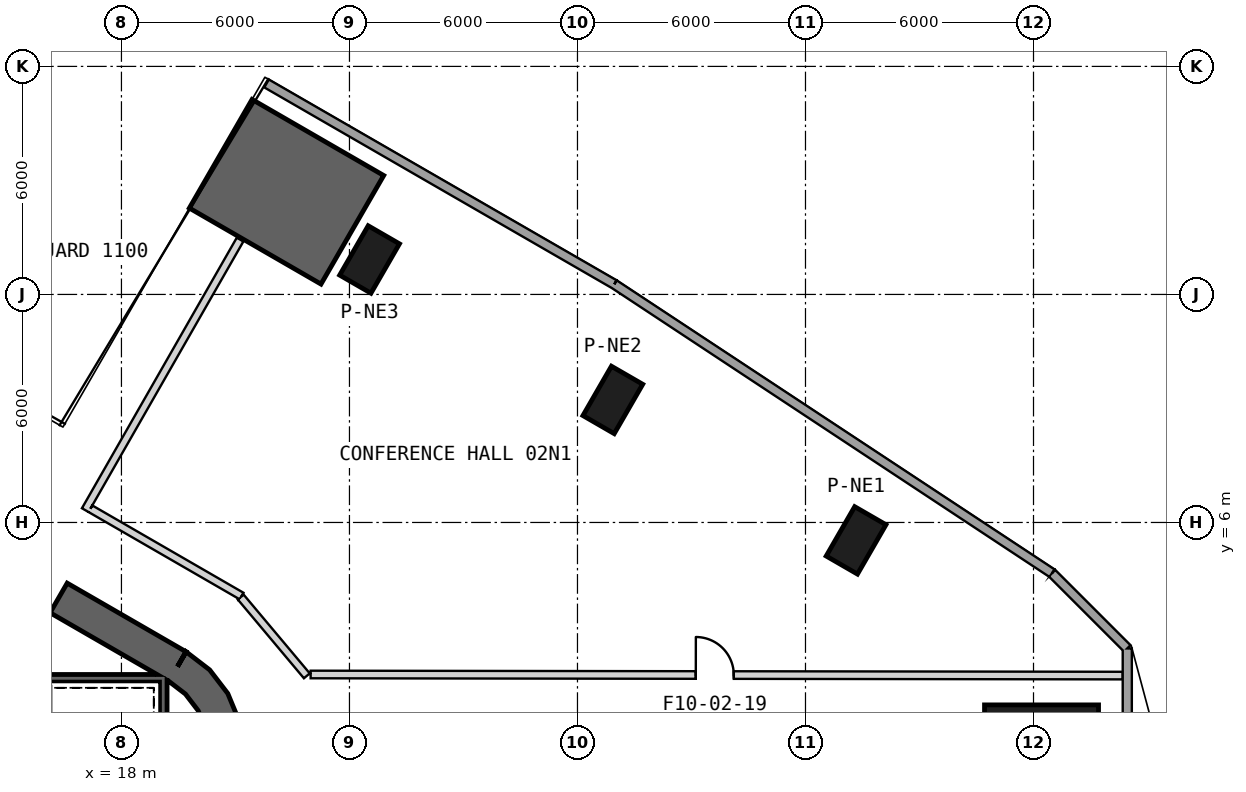
"""IFC4 building model, lengths in metres.
Left out: names, types, materials, properties, quantities, classifications, styles, units other than length and angle.
Written with IfcOpenShell. Run it as: python <this file> out.ifc"""

import sys

from ifc_helpers import new_model, si_unit, direction, frame, frame_2d, origin, origin_2d, place, context, subcontext, project, spatial, polyline, rectangle, outline, extrude, element, fill, save


model = new_model("IFC4")
c1 = context("Model", 3, precision=1e-05, world=origin(), true_north=direction((0.0, 1.0)))
c2 = subcontext(c1, "Body", "Model", "MODEL_VIEW")
j1 = project(units=[si_unit("LENGTHUNIT", "METRE"), si_unit("PLANEANGLEUNIT", "RADIAN")], contexts=[c1])
p1 = place(None, origin())
s1 = spatial("IfcSite", under=j1, at=p1, CompositionType="ELEMENT")
p2 = place(p1, origin())
s2 = spatial("IfcBuilding", under=s1, at=p2, CompositionType="ELEMENT")
p3 = place(p2, frame((0.0, 0.0, 15.5)))
s3 = spatial("IfcBuildingStorey", under=s2, at=p3, CompositionType="ELEMENT", Elevation=15.5)
p4 = place(p3, frame((42.211, 0.0, 0.0), z_axis=(0.0, 0.0, 1.0), x_axis=(1.0, 0.0, 0.0)))
e1 = element("IfcColumn", 1, at=p4, inside=s3, PredefinedType="COLUMN", context=c2, shape_type="SweptSolid", body=[
    extrude(rectangle(XDim=3.0, YDim=2.4, at=origin_2d()), origin(), (0.0, 0.0, 1.0), 6.0),
])
for number, where, z_axis, x_axis in (
    (2, (37.331, 5.528, 0.0), (0.0, 0.0, 1.0), (0.5, 0.866, 0.0)),
    (3, (30.93, 9.224, 0.0), (0.0, 0.0, 1.0), (0.5, 0.866, 0.0)),
    (4, (24.529, 12.92, 0.0), (0.0, 0.0, 1.0), (0.5, 0.866, 0.0)),
):
    element("IfcColumn", number, at=place(p3, frame(where, z_axis=z_axis, x_axis=x_axis)), inside=s3, PredefinedType="COLUMN", context=c2, shape_type="SweptSolid", body=[
        extrude(rectangle(XDim=1.5, YDim=0.95, at=origin_2d()), origin(), (0.0, 0.0, 1.0), 6.0),
    ])
p5 = place(p3, frame((19.475, 2.208, 0.0), z_axis=(0.0, 0.0, 1.0), x_axis=(-0.866028369851, 0.499994862586, 0.0)))
e5 = element("IfcWall", 5, at=p5, inside=s3, PredefinedType="SHEAR", context=c2, shape_type="SweptSolid", body=[
    extrude(rectangle(XDim=31.523, YDim=0.9, at=frame_2d((15.762, 0.0))), origin(), (0.0, 0.0, 1.0), 6.0),
])
p6 = place(p5, frame((7.062, 0.0, 0.0)))
e6 = element("IfcOpeningElement", 6, at=p6, cuts=e5, PredefinedType="OPENING", context=c2, shape_type="SweptSolid", body=[
    extrude(rectangle(XDim=1.2, YDim=2.4, at=frame_2d((0.6, 1.2))), frame((0.0, 0.46, 0.0), z_axis=(0.0, -1.0, 0.0), x_axis=(1.0, 0.0, 0.0)), (0.0, 0.0, 1.0), 0.92),
])
p7 = place(p5, frame((9.762, 0.0, 0.0)))
e7 = element("IfcOpeningElement", 7, at=p7, cuts=e5, PredefinedType="OPENING", context=c2, shape_type="SweptSolid", body=[
    extrude(rectangle(XDim=1.2, YDim=2.4, at=frame_2d((0.6, 1.2))), frame((0.0, 0.46, 0.0), z_axis=(0.0, -1.0, 0.0), x_axis=(1.0, 0.0, 0.0)), (0.0, 0.0, 1.0), 0.92),
])
p8 = place(p5, frame((12.462, 0.0, 0.0)))
e8 = element("IfcOpeningElement", 8, at=p8, cuts=e5, PredefinedType="OPENING", context=c2, shape_type="SweptSolid", body=[
    extrude(rectangle(XDim=1.2, YDim=2.4, at=frame_2d((0.6, 1.2))), frame((0.0, 0.46, 0.0), z_axis=(0.0, -1.0, 0.0), x_axis=(1.0, 0.0, 0.0)), (0.0, 0.0, 1.0), 0.92),
])
p9 = place(p5, frame((15.162, 0.0, 0.0)))
e9 = element("IfcOpeningElement", 9, at=p9, cuts=e5, PredefinedType="OPENING", context=c2, shape_type="SweptSolid", body=[
    extrude(rectangle(XDim=1.2, YDim=2.4, at=frame_2d((0.6, 1.2))), frame((0.0, 0.46, 0.0), z_axis=(0.0, -1.0, 0.0), x_axis=(1.0, 0.0, 0.0)), (0.0, 0.0, 1.0), 0.92),
])
p10 = place(p5, frame((17.862, 0.0, 0.0)))
e10 = element("IfcOpeningElement", 10, at=p10, cuts=e5, PredefinedType="OPENING", context=c2, shape_type="SweptSolid", body=[
    extrude(rectangle(XDim=1.2, YDim=2.4, at=frame_2d((0.6, 1.2))), frame((0.0, 0.46, 0.0), z_axis=(0.0, -1.0, 0.0), x_axis=(1.0, 0.0, 0.0)), (0.0, 0.0, 1.0), 0.92),
])
p11 = place(p5, frame((20.562, 0.0, 0.0)))
e11 = element("IfcOpeningElement", 11, at=p11, cuts=e5, PredefinedType="OPENING", context=c2, shape_type="SweptSolid", body=[
    extrude(rectangle(XDim=1.2, YDim=2.4, at=frame_2d((0.6, 1.2))), frame((0.0, 0.46, 0.0), z_axis=(0.0, -1.0, 0.0), x_axis=(1.0, 0.0, 0.0)), (0.0, 0.0, 1.0), 0.92),
])
p12 = place(p5, frame((23.262, 0.0, 0.0)))
e12 = element("IfcOpeningElement", 12, at=p12, cuts=e5, PredefinedType="OPENING", context=c2, shape_type="SweptSolid", body=[
    extrude(rectangle(XDim=1.2, YDim=2.4, at=frame_2d((0.6, 1.2))), frame((0.0, 0.46, 0.0), z_axis=(0.0, -1.0, 0.0), x_axis=(1.0, 0.0, 0.0)), (0.0, 0.0, 1.0), 0.92),
])
p13 = place(p5, frame((3.612, 0.0, 0.0)))
e13 = element("IfcOpeningElement", 13, at=p13, cuts=e5, PredefinedType="OPENING", context=c2, shape_type="SweptSolid", body=[
    extrude(rectangle(XDim=1.2, YDim=2.4, at=frame_2d((0.6, 1.2))), frame((0.0, 0.46, 0.0), z_axis=(0.0, -1.0, 0.0), x_axis=(1.0, 0.0, 0.0)), (0.0, 0.0, 1.0), 0.92),
])
p14 = place(p5, frame((26.712, 0.0, 0.0)))
e14 = element("IfcOpeningElement", 14, at=p14, cuts=e5, PredefinedType="OPENING", context=c2, shape_type="SweptSolid", body=[
    extrude(rectangle(XDim=1.2, YDim=2.4, at=frame_2d((0.6, 1.2))), frame((0.0, 0.46, 0.0), z_axis=(0.0, -1.0, 0.0), x_axis=(1.0, 0.0, 0.0)), (0.0, 0.0, 1.0), 0.92),
])
p15 = place(p3, origin())
e15 = element("IfcWall", 15, at=p15, inside=s3, PredefinedType="SHEAR", context=c2, shape_type="SweptSolid", body=[
    extrude(outline(polyline([(19.7, -2.598), (20.321, -2.121), (20.798, -1.5), (21.098, -0.777), (21.2, 0.0), (21.098, 0.777), (20.798, 1.5), (20.321, 2.121), (19.7, 2.598), (19.25, 1.819), (19.685, 1.485), (20.019, 1.05), (20.229, 0.543), (20.3, 0.0), (20.229, -0.543), (20.019, -1.05), (19.685, -1.485), (19.25, -1.819), (19.7, -2.598)])), origin(), (0.0, 0.0, 1.0), 6.0),
])
p16 = place(p3, origin())
e16 = element("IfcWall", 16, at=p16, inside=s3, PredefinedType="SHEAR", context=c2, shape_type="SweptSolid", body=[
    extrude(outline(polyline([(24.901, 15.13), (21.437, 17.13), (19.787, 14.272), (23.251, 12.272), (24.901, 15.13)])), origin(), (0.0, 0.0, 1.0), 6.0),
])
p17 = place(p3, frame((42.487, 4.666, 0.0), z_axis=(0.0, 0.0, 1.0), x_axis=(-0.834569880428, 0.550902091739, 0.0)))
e17 = element("IfcWall", 17, at=p17, inside=s3, PredefinedType="SOLIDWALL", context=c2, shape_type="SweptSolid", body=[
    extrude(rectangle(XDim=13.802, YDim=0.24, at=frame_2d((6.901, 0.0))), origin(), (0.0, 0.0, 1.0), 5.7),
])
p18 = place(p3, frame((30.969, 12.269, 0.0), z_axis=(0.0, 0.0, 1.0), x_axis=(-0.86605207128, 0.499953807697, 0.0)))
e18 = element("IfcWall", 18, at=p18, inside=s3, PredefinedType="SOLIDWALL", context=c2, shape_type="SweptSolid", body=[
    extrude(rectangle(XDim=10.566, YDim=0.24, at=frame_2d((5.283, 0.0))), origin(), (0.0, 0.0, 1.0), 5.7),
])
p19 = place(p3, frame((44.468, -2.686, 0.0), z_axis=(0.0, 0.0, 1.0), x_axis=(0.0, 1.0, 0.0)))
e19 = element("IfcWall", 19, at=p19, inside=s3, PredefinedType="SOLIDWALL", context=c2, shape_type="SweptSolid", body=[
    extrude(rectangle(XDim=5.371, YDim=0.24, at=frame_2d((2.686, 0.0))), origin(), (0.0, 0.0, 1.0), 5.7),
])
p20 = place(p3, frame((44.468, 2.686, 0.0), z_axis=(0.0, 0.0, 1.0), x_axis=(-0.707106781187, 0.707106781187, 0.0)))
e20 = element("IfcWall", 20, at=p20, inside=s3, PredefinedType="SOLIDWALL", context=c2, shape_type="SweptSolid", body=[
    extrude(rectangle(XDim=2.801, YDim=0.24, at=frame_2d((1.4, 0.0))), origin(), (0.0, 0.0, 1.0), 5.7),
])
p21 = place(p3, frame((19.2, 1.9, -0.3), z_axis=(0.0, 0.0, 1.0), x_axis=(-1.0, 0.0, 0.0)))
e21 = element("IfcWall", 21, at=p21, inside=s3, PredefinedType="SHEAR", context=c2, shape_type="SweptSolid", body=[
    extrude(rectangle(XDim=8.1, YDim=0.2, at=frame_2d((4.05, 0.0))), origin(), (0.0, 0.0, 1.0), 6.0),
])
p22 = place(p3, frame((19.1, 0.11, -0.3), z_axis=(0.0, 0.0, 1.0), x_axis=(0.0, 1.0, 0.0)))
e22 = element("IfcWall", 22, at=p22, inside=s3, PredefinedType="SHEAR", context=c2, shape_type="SweptSolid", body=[
    extrude(rectangle(XDim=1.69, YDim=0.2, at=frame_2d((0.845, 0.0))), origin(), (0.0, 0.0, 1.0), 6.0),
])
p23 = place(p3, frame((17.047, 6.324, 0.0), z_axis=(0.0, 0.0, 1.0), x_axis=(0.496747817183, 0.867894928044, 0.0)))
e23 = element("IfcWall", 23, at=p23, inside=s3, PredefinedType="PARTITIONING", context=c2, shape_type="SweptSolid", body=[
    extrude(rectangle(XDim=8.203, YDim=0.2, at=frame_2d((4.102, 0.0))), origin(), (0.0, 0.0, 1.0), 5.17),
])
p24 = place(p3, frame((21.161, 4.064, 0.0), z_axis=(0.0, 0.0, 1.0), x_axis=(-0.865947440868, 0.500135011425, 0.0)))
e24 = element("IfcWall", 24, at=p24, inside=s3, PredefinedType="PARTITIONING", context=c2, shape_type="SweptSolid", body=[
    extrude(rectangle(XDim=4.593, YDim=0.2, at=frame_2d((2.296, 0.0))), origin(), (0.0, 0.0, 1.0), 4.88),
])
p25 = place(p3, frame((22.878, 1.965, 0.0), z_axis=(0.0, 0.0, 1.0), x_axis=(-0.642798464348, 0.766035334846, 0.0)))
e25 = element("IfcWall", 25, at=p25, inside=s3, PredefinedType="PARTITIONING", context=c2, shape_type="SweptSolid", body=[
    extrude(rectangle(XDim=2.706, YDim=0.2, at=frame_2d((1.353, 0.0))), origin(), (0.0, 0.0, 1.0), 4.78),
])
p26 = place(p3, frame((22.979, 2.0, 0.0), z_axis=(0.0, 0.0, 1.0), x_axis=(0.999999091219, -0.001348169604, 0.0)))
e26 = element("IfcWall", 26, at=p26, inside=s3, PredefinedType="PARTITIONING", context=c2, shape_type="SweptSolid", body=[
    extrude(rectangle(XDim=21.369, YDim=0.2, at=frame_2d((10.684, 0.0))), origin(), (0.0, 0.0, 1.0), 5.7),
])
p27 = place(p26, frame((10.135, 0.0, 0.0)))
e27 = element("IfcOpeningElement", 27, at=p27, cuts=e26, PredefinedType="OPENING", context=c2, shape_type="SweptSolid", body=[
    extrude(rectangle(XDim=1.0, YDim=2.1, at=frame_2d((0.5, 1.05))), frame((0.0, 0.11, 0.0), z_axis=(0.0, -1.0, 0.0), x_axis=(1.0, 0.0, 0.0)), (0.0, 0.0, 1.0), 0.22),
])
p28 = place(p27, origin())
e28 = element("IfcDoor", 28, at=p28, inside=s3, OperationType="SINGLE_SWING_LEFT", PredefinedType="USERDEFINED", context=c2, shape_type="SweptSolid", body=[
    extrude(rectangle(XDim=1.0, YDim=2.1, at=frame_2d((0.5, 1.05))), frame((0.0, 0.025, 0.0), z_axis=(0.0, -1.0, 0.0), x_axis=(1.0, 0.0, 0.0)), (0.0, 0.0, 1.0), 0.05),
])
fill(e27, e28)
p29 = place(p13, origin())
e29 = element("IfcDoor", 29, at=p29, inside=s3, OperationType="SINGLE_SWING_LEFT", PredefinedType="USERDEFINED", context=c2, shape_type="SweptSolid", body=[
    extrude(rectangle(XDim=1.2, YDim=2.4, at=frame_2d((0.6, 1.2))), frame((0.0, 0.025, 0.0), z_axis=(0.0, -1.0, 0.0), x_axis=(1.0, 0.0, 0.0)), (0.0, 0.0, 1.0), 0.05),
])
fill(e13, e29)
save(model, sys.argv[1])
